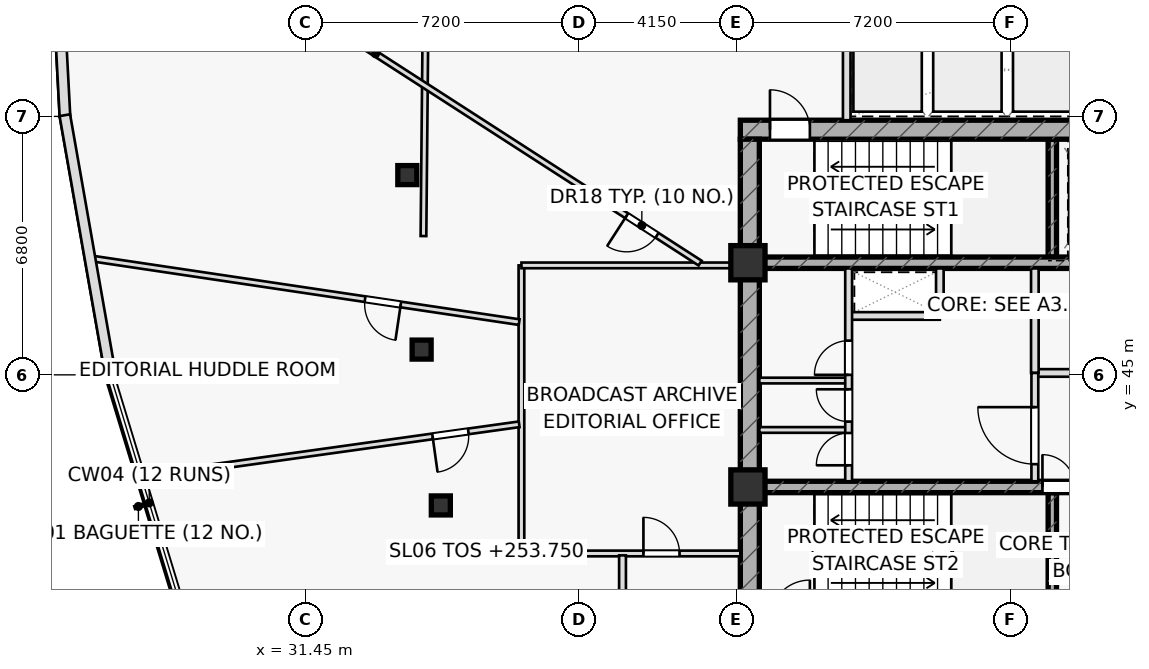
"""IFC4 building model, lengths in metres.
Left out: names, types, materials, properties, quantities, classifications, styles, units other than length and angle.
Written with IfcOpenShell. Run it as: python <this file> out.ifc"""

import sys

from ifc_helpers import new_model, si_unit, direction, frame, frame_2d, origin, origin_2d, place, context, subcontext, project, spatial, rectangle, hollow_rectangle, extrude, element, fill, save


model = new_model("IFC4")
c1 = context("Model", 3, precision=1e-05, world=origin(), true_north=direction((0.0, 1.0)))
c2 = subcontext(c1, "Body", "Model", "MODEL_VIEW")
j1 = project(units=[si_unit("LENGTHUNIT", "METRE"), si_unit("PLANEANGLEUNIT", "RADIAN")], contexts=[c1])
p1 = place(None, origin())
s1 = spatial("IfcSite", under=j1, at=p1, CompositionType="ELEMENT")
p2 = place(p1, origin())
s2 = spatial("IfcBuilding", under=s1, at=p2, CompositionType="ELEMENT")
p3 = place(p2, frame((0.0, 0.0, 253.75)))
s3 = spatial("IfcBuildingStorey", under=s2, at=p3, CompositionType="ELEMENT", Elevation=253.75)
for number, where, z_axis, x_axis in (
    (1, (51.11, 48.1, 0.0), (0.0, 0.0, 1.0), (0.0, 1.0, 0.0)),
    (2, (51.11, 38.8, 0.0), (0.0, 0.0, 1.0), (0.0, 1.0, 0.0)),
):
    element("IfcWall", number, at=place(p3, frame(where, z_axis=z_axis, x_axis=x_axis)), inside=s3, PredefinedType="SHEAR", context=c2, shape_type="SweptSolid", body=[
        extrude(rectangle(XDim=3.1, YDim=0.22, at=frame_2d((1.55, 0.0))), origin(), (0.0, 0.0, 1.0), 3.65),
    ])
p4 = place(p3, frame((42.9, 51.45, 0.0), z_axis=(0.0, 0.0, 1.0), x_axis=(1.0, 0.0, 0.0)))
e3 = element("IfcWall", 3, at=p4, inside=s3, PredefinedType="SHEAR", context=c2, shape_type="SweptSolid", body=[
    extrude(rectangle(XDim=14.2, YDim=0.5, at=frame_2d((7.1, 0.0))), origin(), (0.0, 0.0, 1.0), 3.65),
])
p5 = place(p4, frame((0.78, 0.0, 0.0)))
e4 = element("IfcOpeningElement", 4, at=p5, cuts=e3, PredefinedType="OPENING", context=c2, shape_type="SweptSolid", body=[
    extrude(rectangle(XDim=1.05, YDim=2.2, at=frame_2d((0.525, 1.1))), frame((0.0, 0.26, 0.0), z_axis=(0.0, -1.0, 0.0), x_axis=(1.0, 0.0, 0.0)), (0.0, 0.0, 1.0), 0.52),
])
p6 = place(p3, frame((43.15, 38.8, 0.0), z_axis=(0.0, 0.0, 1.0), x_axis=(0.0, 1.0, 0.0)))
e5 = element("IfcWall", 5, at=p6, inside=s3, PredefinedType="SHEAR", context=c2, shape_type="SweptSolid", body=[
    extrude(rectangle(XDim=12.4, YDim=0.5, at=frame_2d((6.2, 0.0))), origin(), (0.0, 0.0, 1.0), 3.65),
])
p7 = place(p3, frame((43.4, 47.95, 0.0), z_axis=(0.0, 0.0, 1.0), x_axis=(1.0, 0.0, 0.0)))
e6 = element("IfcWall", 6, at=p7, inside=s3, PredefinedType="SHEAR", context=c2, shape_type="SweptSolid", body=[
    extrude(rectangle(XDim=13.2, YDim=0.3, at=frame_2d((6.6, 0.0))), origin(), (0.0, 0.0, 1.0), 3.65),
])
p8 = place(p7, frame((8.345, 0.0, 0.0)))
e7 = element("IfcOpeningElement", 7, at=p8, cuts=e6, PredefinedType="OPENING", context=c2, shape_type="SweptSolid", body=[
    extrude(rectangle(XDim=1.15, YDim=2.2, at=frame_2d((0.575, 1.1))), frame((0.0, 0.16, 0.0), z_axis=(0.0, -1.0, 0.0), x_axis=(1.0, 0.0, 0.0)), (0.0, 0.0, 1.0), 0.32),
])
p9 = place(p7, frame((10.065, 0.0, 0.0)))
e8 = element("IfcOpeningElement", 8, at=p9, cuts=e6, PredefinedType="OPENING", context=c2, shape_type="SweptSolid", body=[
    extrude(rectangle(XDim=1.15, YDim=2.2, at=frame_2d((0.575, 1.1))), frame((0.0, 0.16, 0.0), z_axis=(0.0, -1.0, 0.0), x_axis=(1.0, 0.0, 0.0)), (0.0, 0.0, 1.0), 0.32),
])
p10 = place(p7, frame((11.645, 0.0, 0.0)))
e9 = element("IfcOpeningElement", 9, at=p10, cuts=e6, PredefinedType="OPENING", context=c2, shape_type="SweptSolid", body=[
    extrude(rectangle(XDim=1.15, YDim=2.2, at=frame_2d((0.575, 1.1))), frame((0.0, 0.16, 0.0), z_axis=(0.0, -1.0, 0.0), x_axis=(1.0, 0.0, 0.0)), (0.0, 0.0, 1.0), 0.32),
])
p11 = place(p3, frame((43.4, 42.05, 0.0), z_axis=(0.0, 0.0, 1.0), x_axis=(1.0, 0.0, 0.0)))
e10 = element("IfcWall", 10, at=p11, inside=s3, PredefinedType="SHEAR", context=c2, shape_type="SweptSolid", body=[
    extrude(rectangle(XDim=13.2, YDim=0.3, at=frame_2d((6.6, 0.0))), origin(), (0.0, 0.0, 1.0), 3.65),
])
p12 = place(p11, frame((7.45, 0.0, 0.0)))
e11 = element("IfcOpeningElement", 11, at=p12, cuts=e10, PredefinedType="OPENING", context=c2, shape_type="SweptSolid", body=[
    extrude(rectangle(XDim=0.85, YDim=2.05, at=frame_2d((0.425, 1.025))), frame((0.0, 0.16, 0.0), z_axis=(0.0, -1.0, 0.0), x_axis=(1.0, 0.0, 0.0)), (0.0, 0.0, 1.0), 0.32),
])
p13 = place(p11, frame((9.5, 0.0, 0.0)))
e12 = element("IfcOpeningElement", 12, at=p13, cuts=e10, PredefinedType="OPENING", context=c2, shape_type="SweptSolid", body=[
    extrude(rectangle(XDim=0.85, YDim=2.05, at=frame_2d((0.425, 1.025))), frame((0.0, 0.16, 0.0), z_axis=(0.0, -1.0, 0.0), x_axis=(1.0, 0.0, 0.0)), (0.0, 0.0, 1.0), 0.32),
])
p14 = place(p11, frame((11.6, 0.0, 0.0)))
e13 = element("IfcOpeningElement", 13, at=p14, cuts=e10, PredefinedType="OPENING", context=c2, shape_type="SweptSolid", body=[
    extrude(rectangle(XDim=0.85, YDim=2.05, at=frame_2d((0.425, 1.025))), frame((0.0, 0.16, 0.0), z_axis=(0.0, -1.0, 0.0), x_axis=(1.0, 0.0, 0.0)), (0.0, 0.0, 1.0), 0.32),
])
for number, where, z_axis, x_axis in (
    (14, (43.1, 47.95, 0.0), (0.0, 0.0, 1.0), (1.0, 0.0, 0.0)),
    (15, (43.1, 42.05, 0.0), (0.0, 0.0, 1.0), (1.0, 0.0, 0.0)),
):
    element("IfcColumn", number, at=place(p3, frame(where, z_axis=z_axis, x_axis=x_axis)), inside=s3, PredefinedType="COLUMN", context=c2, shape_type="SweptSolid", body=[
        extrude(rectangle(XDim=0.9, YDim=0.9, at=origin_2d()), origin(), (0.0, 0.0, 1.0), 3.65),
    ])
for number, where, z_axis, x_axis in (
    (16, (34.137, 50.256, 0.0), (0.0, 0.0, 1.0), (1.0, 0.0, 0.0)),
    (17, (34.514, 45.665, 0.0), (0.0, 0.0, 1.0), (1.0, 0.0, 0.0)),
    (18, (35.019, 41.564, 0.0), (0.0, 0.0, 1.0), (1.0, 0.0, 0.0)),
):
    element("IfcColumn", number, at=place(p3, frame(where, z_axis=z_axis, x_axis=x_axis)), inside=s3, PredefinedType="COLUMN", context=c2, shape_type="SweptSolid", body=[
        extrude(hollow_rectangle(XDim=0.5, YDim=0.5, WallThickness=0.03, at=origin_2d()), origin(), (0.0, 0.0, 1.0), 3.65),
    ])
p15 = place(p3, frame((45.7, 51.7, 0.0), z_axis=(0.0, 0.0, 1.0), x_axis=(0.0, 1.0, 0.0)))
e19 = element("IfcWall", 19, at=p15, inside=s3, PredefinedType="PARTITIONING", context=c2, shape_type="SweptSolid", body=[
    extrude(rectangle(XDim=2.6, YDim=0.2, at=frame_2d((1.3, 0.0))), origin(), (0.0, 0.0, 1.0), 3.65),
])
p16 = place(p3, frame((45.75, 46.55, 0.0), z_axis=(0.0, 0.0, 1.0), x_axis=(1.0, 0.0, 0.0)))
e20 = element("IfcWall", 20, at=p16, inside=s3, PredefinedType="PARTITIONING", context=c2, shape_type="SweptSolid", body=[
    extrude(rectangle(XDim=2.4, YDim=0.2, at=frame_2d((1.2, 0.0))), origin(), (0.0, 0.0, 1.0), 3.65),
])
p17 = place(p3, frame((48.15, 46.55, 0.0), z_axis=(0.0, 0.0, 1.0), x_axis=(0.0, 1.0, 0.0)))
e21 = element("IfcWall", 21, at=p17, inside=s3, PredefinedType="PARTITIONING", context=c2, shape_type="SweptSolid", body=[
    extrude(rectangle(XDim=1.25, YDim=0.2, at=frame_2d((0.625, 0.0))), origin(), (0.0, 0.0, 1.0), 3.65),
])
p18 = place(p3, frame((50.65, 45.05, 0.0), z_axis=(0.0, 0.0, 1.0), x_axis=(1.0, 0.0, 0.0)))
e22 = element("IfcWall", 22, at=p18, inside=s3, PredefinedType="PARTITIONING", context=c2, shape_type="SweptSolid", body=[
    extrude(rectangle(XDim=5.95, YDim=0.2, at=frame_2d((2.975, 0.0))), origin(), (0.0, 0.0, 1.0), 3.65),
])
p19 = place(p18, frame((1.35, 0.0, 0.0)))
e23 = element("IfcOpeningElement", 23, at=p19, cuts=e22, PredefinedType="OPENING", context=c2, shape_type="SweptSolid", body=[
    extrude(rectangle(XDim=1.5, YDim=2.2, at=frame_2d((0.75, 1.1))), frame((0.0, 0.11, 0.0), z_axis=(0.0, -1.0, 0.0), x_axis=(1.0, 0.0, 0.0)), (0.0, 0.0, 1.0), 0.22),
])
p20 = place(p3, frame((50.65, 45.05, 0.0), z_axis=(0.0, 0.0, 1.0), x_axis=(0.0, 1.0, 0.0)))
e24 = element("IfcWall", 24, at=p20, inside=s3, PredefinedType="PARTITIONING", context=c2, shape_type="SweptSolid", body=[
    extrude(rectangle(XDim=2.75, YDim=0.2, at=frame_2d((1.375, 0.0))), origin(), (0.0, 0.0, 1.0), 3.65),
])
p21 = place(p3, frame((50.65, 42.2, 0.0), z_axis=(0.0, 0.0, 1.0), x_axis=(0.0, 1.0, 0.0)))
e25 = element("IfcWall", 25, at=p21, inside=s3, PredefinedType="PARTITIONING", context=c2, shape_type="SweptSolid", body=[
    extrude(rectangle(XDim=2.85, YDim=0.18, at=frame_2d((1.425, 0.0))), origin(), (0.0, 0.0, 1.0), 3.65),
])
p22 = place(p21, frame((0.45, 0.0, 0.0)))
e26 = element("IfcOpeningElement", 26, at=p22, cuts=e25, PredefinedType="OPENING", context=c2, shape_type="SweptSolid", body=[
    extrude(rectangle(XDim=1.5, YDim=2.2, at=frame_2d((0.75, 1.1))), frame((0.0, 0.1, 0.0), z_axis=(0.0, -1.0, 0.0), x_axis=(1.0, 0.0, 0.0)), (0.0, 0.0, 1.0), 0.2),
])
for number, where, z_axis, x_axis in (
    (27, (43.4, 43.55, 0.0), (0.0, 0.0, 1.0), (1.0, 0.0, 0.0)),
    (28, (43.4, 44.85, 0.0), (0.0, 0.0, 1.0), (1.0, 0.0, 0.0)),
):
    element("IfcWall", number, at=place(p3, frame(where, z_axis=z_axis, x_axis=x_axis)), inside=s3, PredefinedType="PARTITIONING", context=c2, shape_type="SweptSolid", body=[
        extrude(rectangle(XDim=2.35, YDim=0.15, at=frame_2d((1.175, 0.0))), origin(), (0.0, 0.0, 1.0), 3.65),
    ])
p23 = place(p3, frame((45.75, 42.2, 0.0), z_axis=(0.0, 0.0, 1.0), x_axis=(0.0, 1.0, 0.0)))
e29 = element("IfcWall", 29, at=p23, inside=s3, PredefinedType="PARTITIONING", context=c2, shape_type="SweptSolid", body=[
    extrude(rectangle(XDim=5.6, YDim=0.18, at=frame_2d((2.8, 0.0))), origin(), (0.0, 0.0, 1.0), 3.65),
])
p24 = place(p23, frame((0.42, 0.0, 0.0)))
e30 = element("IfcOpeningElement", 30, at=p24, cuts=e29, PredefinedType="OPENING", context=c2, shape_type="SweptSolid", body=[
    extrude(rectangle(XDim=0.85, YDim=2.05, at=frame_2d((0.425, 1.025))), frame((0.0, 0.1, 0.0), z_axis=(0.0, -1.0, 0.0), x_axis=(1.0, 0.0, 0.0)), (0.0, 0.0, 1.0), 0.2),
])
p25 = place(p23, frame((1.57, 0.0, 0.0)))
e31 = element("IfcOpeningElement", 31, at=p25, cuts=e29, PredefinedType="OPENING", context=c2, shape_type="SweptSolid", body=[
    extrude(rectangle(XDim=0.85, YDim=2.05, at=frame_2d((0.425, 1.025))), frame((0.0, 0.1, 0.0), z_axis=(0.0, -1.0, 0.0), x_axis=(1.0, 0.0, 0.0)), (0.0, 0.0, 1.0), 0.2),
])
p26 = place(p23, frame((2.8, 0.0, 0.0)))
e32 = element("IfcOpeningElement", 32, at=p26, cuts=e29, PredefinedType="OPENING", context=c2, shape_type="SweptSolid", body=[
    extrude(rectangle(XDim=0.9, YDim=2.05, at=frame_2d((0.45, 1.025))), frame((0.0, 0.1, 0.0), z_axis=(0.0, -1.0, 0.0), x_axis=(1.0, 0.0, 0.0)), (0.0, 0.0, 1.0), 0.2),
])
p27 = place(p3, frame((34.652, 58.056, 0.0), z_axis=(0.0, 0.0, 1.0), x_axis=(-0.009553538759, -0.999954363907, 0.0)))
e33 = element("IfcWall", 33, at=p27, inside=s3, PredefinedType="PARTITIONING", context=c2, shape_type="SweptSolid", body=[
    extrude(rectangle(XDim=9.404, YDim=0.15, at=frame_2d((4.702, 0.0))), origin(), (0.0, 0.0, 1.0), 3.175),
])
p28 = place(p3, frame((37.14, 40.3, 0.0), z_axis=(0.0, 0.0, 1.0), x_axis=(1.0, 0.0, 0.0)))
e34 = element("IfcWall", 34, at=p28, inside=s3, PredefinedType="PARTITIONING", context=c2, shape_type="SweptSolid", body=[
    extrude(rectangle(XDim=5.76, YDim=0.15, at=frame_2d((2.88, 0.0))), origin(), (0.0, 0.0, 1.0), 3.075),
])
p29 = place(p28, frame((3.21, 0.0, 0.0)))
e35 = element("IfcOpeningElement", 35, at=p29, cuts=e34, PredefinedType="OPENING", context=c2, shape_type="SweptSolid", body=[
    extrude(rectangle(XDim=0.95, YDim=2.05, at=frame_2d((0.475, 1.025))), frame((0.0, 0.085, 0.0), z_axis=(0.0, -1.0, 0.0), x_axis=(1.0, 0.0, 0.0)), (0.0, 0.0, 1.0), 0.17),
])
p30 = place(p3, frame((37.14, 40.3, 0.0), z_axis=(0.0, 0.0, 1.0), x_axis=(0.0, 1.0, 0.0)))
e36 = element("IfcWall", 36, at=p30, inside=s3, PredefinedType="PARTITIONING", context=c2, shape_type="SweptSolid", body=[
    extrude(rectangle(XDim=7.58, YDim=0.15, at=frame_2d((3.79, 0.0))), origin(), (0.0, 0.0, 1.0), 3.65),
])
p31 = place(p3, frame((37.14, 47.88, 0.0), z_axis=(0.0, 0.0, 1.0), x_axis=(1.0, 0.0, 0.0)))
e37 = element("IfcWall", 37, at=p31, inside=s3, PredefinedType="PARTITIONING", context=c2, shape_type="SweptSolid", body=[
    extrude(rectangle(XDim=5.76, YDim=0.15, at=frame_2d((2.88, 0.0))), origin(), (0.0, 0.0, 1.0), 3.075),
])
p32 = place(p3, frame((41.842, 47.94, 0.0), z_axis=(0.0, 0.0, 1.0), x_axis=(-0.840362300132, 0.542025095836, 0.0)))
e38 = element("IfcWall", 38, at=p32, inside=s3, PredefinedType="PARTITIONING", context=c2, shape_type="SweptSolid", body=[
    extrude(rectangle(XDim=20.327, YDim=0.15, at=frame_2d((10.163, 0.0))), origin(), (0.0, 0.0, 1.0), 3.075),
])
p33 = place(p32, frame((1.35, 0.0, 0.0)))
e39 = element("IfcOpeningElement", 39, at=p33, cuts=e38, PredefinedType="OPENING", context=c2, shape_type="SweptSolid", body=[
    extrude(rectangle(XDim=0.95, YDim=2.05, at=frame_2d((0.475, 1.025))), frame((0.0, 0.085, 0.0), z_axis=(0.0, -1.0, 0.0), x_axis=(1.0, 0.0, 0.0)), (0.0, 0.0, 1.0), 0.17),
])
p34 = place(p3, frame((37.08, 46.387, 0.0), z_axis=(0.0, 0.0, 1.0), x_axis=(-0.989098719456, 0.147253941106, 0.0)))
e40 = element("IfcWall", 40, at=p34, inside=s3, PredefinedType="PARTITIONING", context=c2, shape_type="SweptSolid", body=[
    extrude(rectangle(XDim=11.428, YDim=0.15, at=frame_2d((5.714, 0.0))), origin(), (0.0, 0.0, 1.0), 3.075),
])
p35 = place(p34, frame((3.15, 0.0, 0.0)))
e41 = element("IfcOpeningElement", 41, at=p35, cuts=e40, PredefinedType="OPENING", context=c2, shape_type="SweptSolid", body=[
    extrude(rectangle(XDim=0.95, YDim=2.05, at=frame_2d((0.475, 1.025))), frame((0.0, 0.085, 0.0), z_axis=(0.0, -1.0, 0.0), x_axis=(1.0, 0.0, 0.0)), (0.0, 0.0, 1.0), 0.17),
])
p36 = place(p3, frame((37.08, 43.699, 0.0), z_axis=(0.0, 0.0, 1.0), x_axis=(-0.990392593829, -0.13828416427, 0.0)))
e42 = element("IfcWall", 42, at=p36, inside=s3, PredefinedType="PARTITIONING", context=c2, shape_type="SweptSolid", body=[
    extrude(rectangle(XDim=10.047, YDim=0.15, at=frame_2d((5.024, 0.0))), origin(), (0.0, 0.0, 1.0), 3.175),
])
p37 = place(p36, frame((1.35, 0.0, 0.0)))
e43 = element("IfcOpeningElement", 43, at=p37, cuts=e42, PredefinedType="OPENING", context=c2, shape_type="SweptSolid", body=[
    extrude(rectangle(XDim=0.95, YDim=2.05, at=frame_2d((0.475, 1.025))), frame((0.0, 0.085, 0.0), z_axis=(0.0, -1.0, 0.0), x_axis=(1.0, 0.0, 0.0)), (0.0, 0.0, 1.0), 0.17),
])
p38 = place(p3, frame((39.8, 36.17, 0.0), z_axis=(0.0, 0.0, 1.0), x_axis=(0.0, 1.0, 0.0)))
e44 = element("IfcWall", 44, at=p38, inside=s3, PredefinedType="PARTITIONING", context=c2, shape_type="SweptSolid", body=[
    extrude(rectangle(XDim=4.08, YDim=0.18, at=frame_2d((2.04, 0.0))), origin(), (0.0, 0.0, 1.0), 3.355),
])
p39 = place(p38, frame((2.128, 0.0, 0.0)))
e45 = element("IfcOpeningElement", 45, at=p39, cuts=e44, PredefinedType="OPENING", context=c2, shape_type="SweptSolid", body=[
    extrude(rectangle(XDim=0.95, YDim=2.05, at=frame_2d((0.475, 1.025))), frame((0.0, 0.1, 0.0), z_axis=(0.0, -1.0, 0.0), x_axis=(1.0, 0.0, 0.0)), (0.0, 0.0, 1.0), 0.2),
])
p40 = place(p3, frame((24.759, 58.79, 0.0), z_axis=(0.0, 0.0, 1.0), x_axis=(0.052756617358, -0.998607399995, 0.0)))
e46 = element("IfcWall", 46, at=p40, inside=s3, PredefinedType="STANDARD", context=c2, shape_type="SweptSolid", body=[
    extrude(rectangle(XDim=6.997, YDim=0.28, at=frame_2d((3.499, 0.0))), origin(), (0.0, 0.0, 1.0), 3.65),
])
p41 = place(p3, frame((25.125, 51.832, 0.0), z_axis=(0.0, 0.0, 1.0), x_axis=(0.173183155721, -0.984889635733, 0.0)))
e47 = element("IfcWall", 47, at=p41, inside=s3, PredefinedType="STANDARD", context=c2, shape_type="SweptSolid", body=[
    extrude(rectangle(XDim=6.985, YDim=0.28, at=frame_2d((3.493, 0.0))), origin(), (0.0, 0.0, 1.0), 3.65),
])
p42 = place(p5, origin())
e48 = element("IfcDoor", 48, at=p42, inside=s3, OperationType="SINGLE_SWING_LEFT", PredefinedType="DOOR", context=c2, shape_type="SweptSolid", body=[
    extrude(rectangle(XDim=1.05, YDim=2.2, at=frame_2d((0.525, 1.1))), frame((0.0, 0.025, 0.0), z_axis=(0.0, -1.0, 0.0), x_axis=(1.0, 0.0, 0.0)), (0.0, 0.0, 1.0), 0.05),
])
fill(e4, e48)
p43 = place(p22, origin())
e49 = element("IfcDoor", 49, at=p43, inside=s3, OperationType="SINGLE_SWING_RIGHT", PredefinedType="DOOR", context=c2, shape_type="SweptSolid", body=[
    extrude(rectangle(XDim=1.5, YDim=2.2, at=frame_2d((0.75, 1.1))), frame((0.0, 0.025, 0.0), z_axis=(0.0, -1.0, 0.0), x_axis=(1.0, 0.0, 0.0)), (0.0, 0.0, 1.0), 0.05),
])
fill(e26, e49)
p44 = place(p12, origin())
e50 = element("IfcDoor", 50, at=p44, inside=s3, OperationType="SINGLE_SWING_LEFT", PredefinedType="DOOR", context=c2, shape_type="SweptSolid", body=[
    extrude(rectangle(XDim=0.85, YDim=2.05, at=frame_2d((0.425, 1.025))), frame((0.0, 0.025, 0.0), z_axis=(0.0, -1.0, 0.0), x_axis=(1.0, 0.0, 0.0)), (0.0, 0.0, 1.0), 0.05),
])
fill(e11, e50)
p45 = place(p24, origin())
e51 = element("IfcDoor", 51, at=p45, inside=s3, OperationType="SINGLE_SWING_LEFT", PredefinedType="DOOR", context=c2, shape_type="SweptSolid", body=[
    extrude(rectangle(XDim=0.85, YDim=2.05, at=frame_2d((0.425, 1.025))), frame((0.0, 0.025, 0.0), z_axis=(0.0, -1.0, 0.0), x_axis=(1.0, 0.0, 0.0)), (0.0, 0.0, 1.0), 0.05),
])
fill(e30, e51)
p46 = place(p25, origin())
e52 = element("IfcDoor", 52, at=p46, inside=s3, OperationType="SINGLE_SWING_RIGHT", PredefinedType="DOOR", context=c2, shape_type="SweptSolid", body=[
    extrude(rectangle(XDim=0.85, YDim=2.05, at=frame_2d((0.425, 1.025))), frame((0.0, 0.025, 0.0), z_axis=(0.0, -1.0, 0.0), x_axis=(1.0, 0.0, 0.0)), (0.0, 0.0, 1.0), 0.05),
])
fill(e31, e52)
p47 = place(p26, origin())
e53 = element("IfcDoor", 53, at=p47, inside=s3, OperationType="SINGLE_SWING_LEFT", PredefinedType="DOOR", context=c2, shape_type="SweptSolid", body=[
    extrude(rectangle(XDim=0.9, YDim=2.05, at=frame_2d((0.45, 1.025))), frame((0.0, 0.025, 0.0), z_axis=(0.0, -1.0, 0.0), x_axis=(1.0, 0.0, 0.0)), (0.0, 0.0, 1.0), 0.05),
])
fill(e32, e53)
p48 = place(p29, origin())
e54 = element("IfcDoor", 54, at=p48, inside=s3, OperationType="SINGLE_SWING_LEFT", PredefinedType="DOOR", context=c2, shape_type="SweptSolid", body=[
    extrude(rectangle(XDim=0.95, YDim=2.05, at=frame_2d((0.475, 1.025))), frame((0.0, 0.025, 0.0), z_axis=(0.0, -1.0, 0.0), x_axis=(1.0, 0.0, 0.0)), (0.0, 0.0, 1.0), 0.05),
])
fill(e35, e54)
p49 = place(p33, origin())
e55 = element("IfcDoor", 55, at=p49, inside=s3, OperationType="SINGLE_SWING_RIGHT", PredefinedType="DOOR", context=c2, shape_type="SweptSolid", body=[
    extrude(rectangle(XDim=0.95, YDim=2.05, at=frame_2d((0.475, 1.025))), frame((0.0, 0.025, 0.0), z_axis=(0.0, -1.0, 0.0), x_axis=(1.0, 0.0, 0.0)), (0.0, 0.0, 1.0), 0.05),
])
fill(e39, e55)
p50 = place(p35, origin())
e56 = element("IfcDoor", 56, at=p50, inside=s3, OperationType="SINGLE_SWING_LEFT", PredefinedType="DOOR", context=c2, shape_type="SweptSolid", body=[
    extrude(rectangle(XDim=0.95, YDim=2.05, at=frame_2d((0.475, 1.025))), frame((0.0, 0.025, 0.0), z_axis=(0.0, -1.0, 0.0), x_axis=(1.0, 0.0, 0.0)), (0.0, 0.0, 1.0), 0.05),
])
fill(e41, e56)
p51 = place(p37, origin())
e57 = element("IfcDoor", 57, at=p51, inside=s3, OperationType="SINGLE_SWING_RIGHT", PredefinedType="DOOR", context=c2, shape_type="SweptSolid", body=[
    extrude(rectangle(XDim=0.95, YDim=2.05, at=frame_2d((0.475, 1.025))), frame((0.0, 0.025, 0.0), z_axis=(0.0, -1.0, 0.0), x_axis=(1.0, 0.0, 0.0)), (0.0, 0.0, 1.0), 0.05),
])
fill(e43, e57)
save(model, sys.argv[1])
